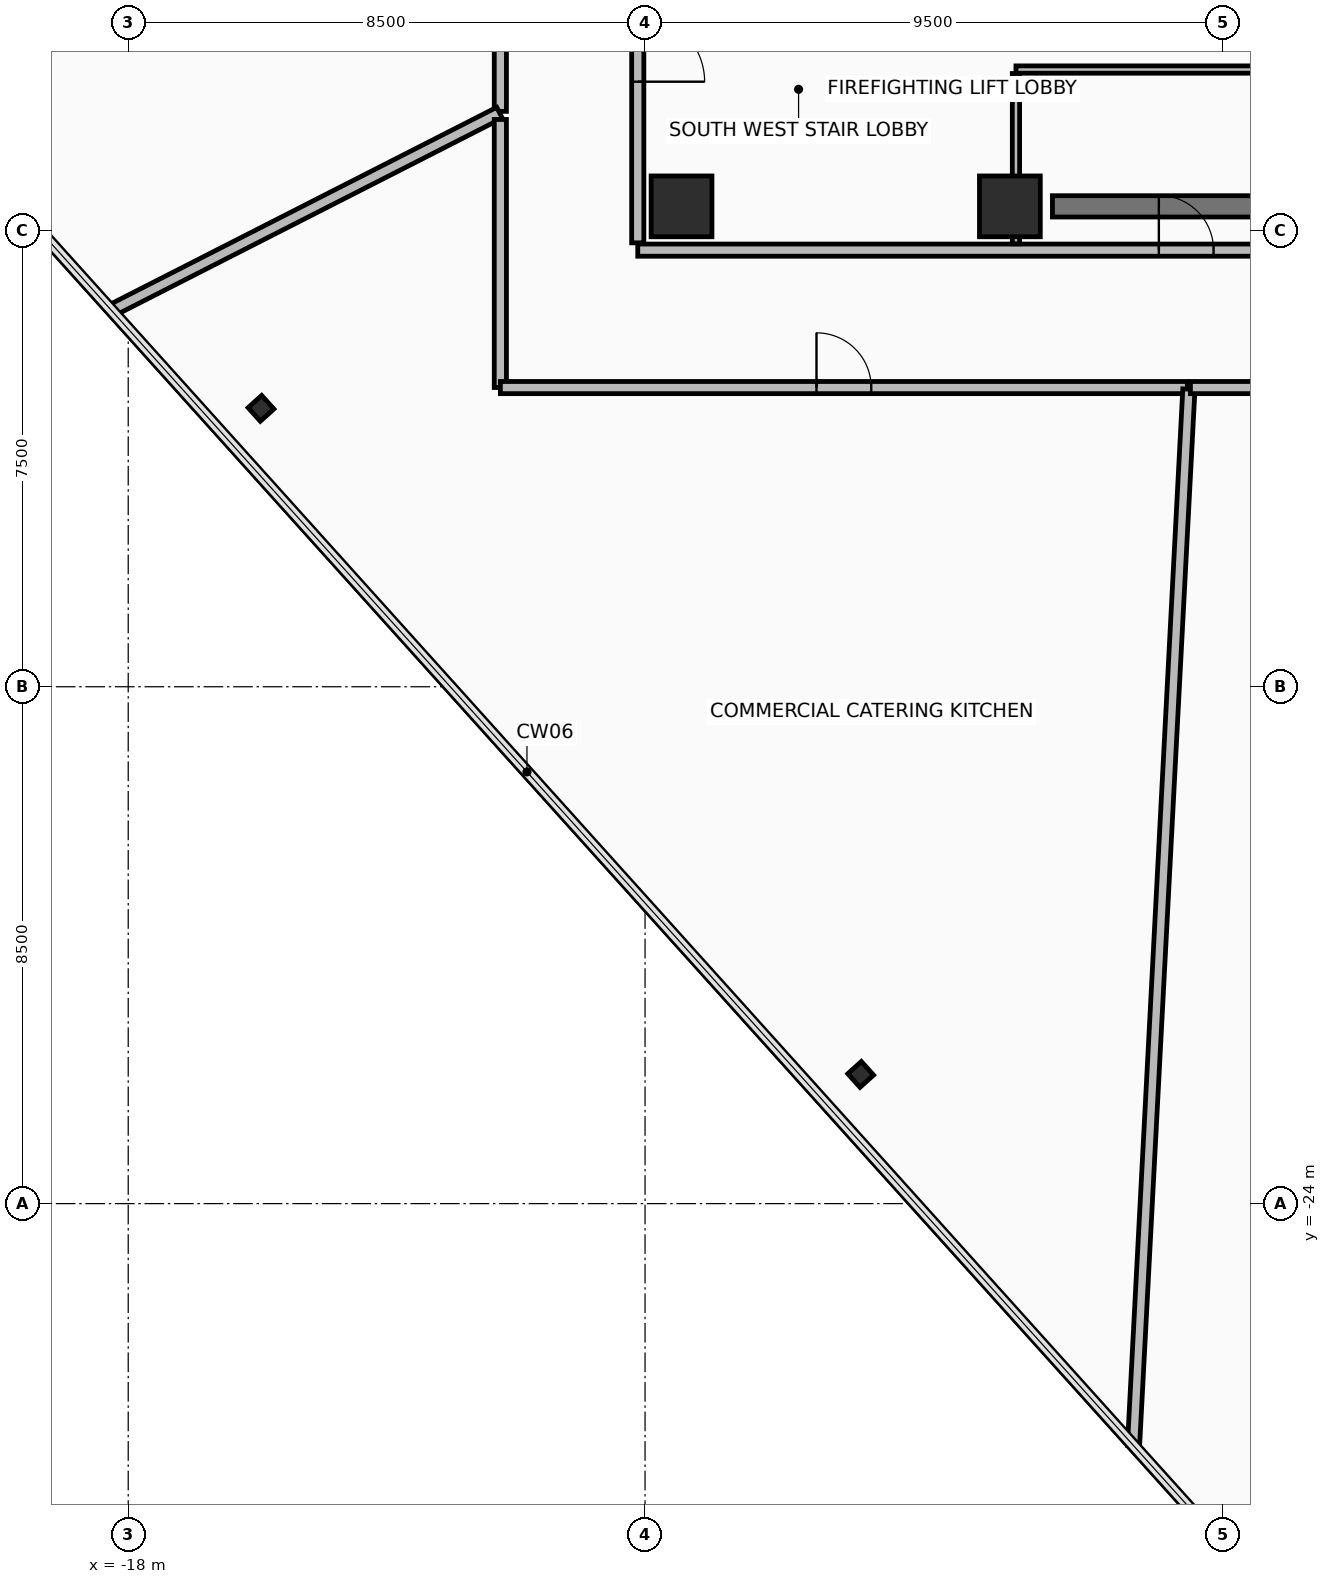
"""IFC4 building model, lengths in metres.
Left out: names, types, materials, properties, quantities, classifications, styles, units other than length and angle.
Written with IfcOpenShell. Run it as: python <this file> out.ifc"""

import sys

from ifc_helpers import new_model, si_unit, direction, frame, frame_2d, origin, origin_2d, place, context, subcontext, project, spatial, rectangle, hollow_rectangle, extrude, element, fill, save


model = new_model("IFC4")
c1 = context("Model", 3, precision=1e-05, world=origin(), true_north=direction((0.0, 1.0)))
c2 = subcontext(c1, "Body", "Model", "MODEL_VIEW")
j1 = project(units=[si_unit("LENGTHUNIT", "METRE"), si_unit("PLANEANGLEUNIT", "RADIAN")], contexts=[c1])
p1 = place(None, origin())
s1 = spatial("IfcSite", under=j1, at=p1, CompositionType="ELEMENT")
p2 = place(p1, origin())
s2 = spatial("IfcBuilding", under=s1, at=p2, CompositionType="ELEMENT")
p3 = place(p2, frame((0.0, 0.0, 298.0)))
s3 = spatial("IfcBuildingStorey", under=s2, at=p3, CompositionType="ELEMENT", Elevation=298.0)
for number, where, z_axis, x_axis in (
    (1, (-8.9, -7.6, 0.0), (0.0, 0.0, 1.0), (1.0, 0.0, 0.0)),
    (2, (-3.5, -7.6, 0.0), (0.0, 0.0, 1.0), (1.0, 0.0, 0.0)),
):
    element("IfcColumn", number, at=place(p3, frame(where, z_axis=z_axis, x_axis=x_axis)), inside=s3, PredefinedType="COLUMN", context=c2, shape_type="SweptSolid", body=[
        extrude(rectangle(XDim=1.0, YDim=1.0, at=origin_2d()), origin(), (0.0, 0.0, 1.0), 4.15),
    ])
for number, where, z_axis, x_axis in (
    (3, (-15.816, -10.922, 0.0), (0.0, 0.0, 1.0), (-0.669, 0.743, 0.0)),
    (4, (-5.954, -21.875, 0.0), (0.0, 0.0, 1.0), (-0.669, 0.743, 0.0)),
):
    element("IfcColumn", number, at=place(p3, frame(where, z_axis=z_axis, x_axis=x_axis)), inside=s3, PredefinedType="COLUMN", context=c2, shape_type="SweptSolid", body=[
        extrude(hollow_rectangle(XDim=0.3, YDim=0.3, WallThickness=0.02, at=origin_2d()), origin(), (0.0, 0.0, 1.0), 4.15),
    ])
p4 = place(p3, frame((-2.8, -7.6, 0.0), z_axis=(0.0, 0.0, 1.0), x_axis=(1.0, 0.0, 0.0)))
e5 = element("IfcWall", 5, at=p4, inside=s3, PredefinedType="SHEAR", context=c2, shape_type="SweptSolid", body=[
    extrude(rectangle(XDim=5.38, YDim=0.35, at=frame_2d((2.69, 0.0))), origin(), (0.0, 0.0, 1.0), 3.95),
])
p5 = place(p3, frame((-9.62, -8.32, 0.0), z_axis=(0.0, 0.0, 1.0), x_axis=(1.0, 0.0, 0.0)))
e6 = element("IfcWall", 6, at=p5, inside=s3, PredefinedType="PARTITIONING", context=c2, shape_type="SweptSolid", body=[
    extrude(rectangle(XDim=19.24, YDim=0.2, at=frame_2d((9.62, 0.0))), origin(), (0.0, 0.0, 1.0), 3.445),
])
p6 = place(p5, frame((8.57, 0.0, 0.0)))
e7 = element("IfcOpeningElement", 7, at=p6, cuts=e6, PredefinedType="OPENING", context=c2, shape_type="SweptSolid", body=[
    extrude(rectangle(XDim=0.9, YDim=2.1, at=frame_2d((0.45, 1.05))), frame((0.0, 0.11, 0.0), z_axis=(0.0, -1.0, 0.0), x_axis=(1.0, 0.0, 0.0)), (0.0, 0.0, 1.0), 0.22),
])
p7 = place(p5, frame((14.045, 0.0, 0.0)))
e8 = element("IfcOpeningElement", 8, at=p7, cuts=e6, PredefinedType="OPENING", context=c2, shape_type="SweptSolid", body=[
    extrude(rectangle(XDim=0.9, YDim=2.1, at=frame_2d((0.45, 1.05))), frame((0.0, 0.11, 0.0), z_axis=(0.0, -1.0, 0.0), x_axis=(1.0, 0.0, 0.0)), (0.0, 0.0, 1.0), 0.22),
])
p8 = place(p5, frame((15.995, 0.0, 0.0)))
e9 = element("IfcOpeningElement", 9, at=p8, cuts=e6, PredefinedType="OPENING", context=c2, shape_type="SweptSolid", body=[
    extrude(rectangle(XDim=0.9, YDim=2.1, at=frame_2d((0.45, 1.05))), frame((0.0, 0.11, 0.0), z_axis=(0.0, -1.0, 0.0), x_axis=(1.0, 0.0, 0.0)), (0.0, 0.0, 1.0), 0.22),
])
p9 = place(p3, frame((-9.62, 8.2, 0.0), z_axis=(0.0, 0.0, 1.0), x_axis=(0.0, -1.0, 0.0)))
e10 = element("IfcWall", 10, at=p9, inside=s3, PredefinedType="PARTITIONING", context=c2, shape_type="SweptSolid", body=[
    extrude(rectangle(XDim=16.4, YDim=0.2, at=frame_2d((8.2, 0.0))), origin(), (0.0, 0.0, 1.0), 3.295),
])
p10 = place(p9, frame((12.65, 0.0, 0.0)))
e11 = element("IfcOpeningElement", 11, at=p10, cuts=e10, PredefinedType="OPENING", context=c2, shape_type="SweptSolid", body=[
    extrude(rectangle(XDim=1.1, YDim=2.15, at=frame_2d((0.55, 1.075))), frame((0.0, 0.11, 0.0), z_axis=(0.0, -1.0, 0.0), x_axis=(1.0, 0.0, 0.0)), (0.0, 0.0, 1.0), 0.22),
])
p11 = place(p3, frame((2.135, -5.35, 0.0), z_axis=(0.0, 0.0, 1.0), x_axis=(-1.0, 0.0, 0.0)))
e12 = element("IfcWall", 12, at=p11, inside=s3, PredefinedType="PARTITIONING", context=c2, shape_type="SweptSolid", body=[
    extrude(rectangle(XDim=5.535, YDim=0.12, at=frame_2d((2.768, 0.0))), origin(), (0.0, 0.0, 1.0), 3.245),
])
p12 = place(p3, frame((-3.4, -5.415, 0.0), z_axis=(0.0, 0.0, 1.0), x_axis=(0.0, -1.0, 0.0)))
e13 = element("IfcWall", 13, at=p12, inside=s3, PredefinedType="PARTITIONING", context=c2, shape_type="SweptSolid", body=[
    extrude(rectangle(XDim=2.8, YDim=0.12, at=frame_2d((1.4, 0.0))), origin(), (0.0, 0.0, 1.0), 3.245),
])
p13 = place(p3, frame((-11.88, 9.646, 0.0), z_axis=(0.0, 0.0, 1.0), x_axis=(0.0, -1.0, 0.0)))
e14 = element("IfcWall", 14, at=p13, inside=s3, PredefinedType="PARTITIONING", context=c2, shape_type="SweptSolid", body=[
    extrude(rectangle(XDim=15.684, YDim=0.2, at=frame_2d((7.842, 0.0))), origin(), (0.0, 0.0, 1.0), 3.295),
])
p14 = place(p13, frame((7.342, 0.0, 0.0)))
e15 = element("IfcOpeningElement", 15, at=p14, cuts=e14, PredefinedType="OPENING", context=c2, shape_type="SweptSolid", body=[
    extrude(rectangle(XDim=1.0, YDim=2.15, at=frame_2d((0.5, 1.075))), frame((0.0, 0.11, 0.0), z_axis=(0.0, -1.0, 0.0), x_axis=(1.0, 0.0, 0.0)), (0.0, 0.0, 1.0), 0.22),
])
p15 = place(p3, frame((-11.894, -6.06, 0.0), z_axis=(0.0, 0.0, 1.0), x_axis=(-0.890996976005, -0.454009238617, 0.0)))
e16 = element("IfcWall", 16, at=p15, inside=s3, PredefinedType="PARTITIONING", context=c2, shape_type="SweptSolid", body=[
    extrude(rectangle(XDim=7.143, YDim=0.2, at=frame_2d((3.571, 0.0))), origin(), (0.0, 0.0, 1.0), 3.295),
])
p16 = place(p3, frame((-11.88, -6.171, 0.0), z_axis=(0.0, 0.0, 1.0), x_axis=(0.0, -1.0, 0.0)))
e17 = element("IfcWall", 17, at=p16, inside=s3, PredefinedType="PARTITIONING", context=c2, shape_type="SweptSolid", body=[
    extrude(rectangle(XDim=4.408, YDim=0.2, at=frame_2d((2.204, 0.0))), origin(), (0.0, 0.0, 1.0), 3.445),
])
p17 = place(p3, frame((-11.879, -10.58, 0.0), z_axis=(0.0, 0.0, 1.0), x_axis=(1.0, 0.0, 0.0)))
e18 = element("IfcWall", 18, at=p17, inside=s3, PredefinedType="PARTITIONING", context=c2, shape_type="SweptSolid", body=[
    extrude(rectangle(XDim=11.299, YDim=0.2, at=frame_2d((5.649, 0.0))), origin(), (0.0, 0.0, 1.0), 3.445),
])
p18 = place(p17, frame((5.199, 0.0, 0.0)))
e19 = element("IfcOpeningElement", 19, at=p18, cuts=e18, PredefinedType="OPENING", context=c2, shape_type="SweptSolid", body=[
    extrude(rectangle(XDim=0.9, YDim=2.1, at=frame_2d((0.45, 1.05))), frame((0.0, 0.11, 0.0), z_axis=(0.0, -1.0, 0.0), x_axis=(1.0, 0.0, 0.0)), (0.0, 0.0, 1.0), 0.22),
])
p19 = place(p3, frame((-0.556, -10.606, 0.0), z_axis=(0.0, 0.0, 1.0), x_axis=(-0.052329765113, -0.998629859199, 0.0)))
e20 = element("IfcWall", 20, at=p19, inside=s3, PredefinedType="PARTITIONING", context=c2, shape_type="SweptSolid", body=[
    extrude(rectangle(XDim=17.397, YDim=0.2, at=frame_2d((8.699, 0.0))), origin(), (0.0, 0.0, 1.0), 3.295),
])
p20 = place(p3, frame((-0.531, -10.58, 0.0), z_axis=(0.0, 0.0, 1.0), x_axis=(1.0, 0.0, 0.0)))
e21 = element("IfcWall", 21, at=p20, inside=s3, PredefinedType="PARTITIONING", context=c2, shape_type="SweptSolid", body=[
    extrude(rectangle(XDim=12.41, YDim=0.2, at=frame_2d((6.205, 0.0))), origin(), (0.0, 0.0, 1.0), 3.445),
])
p21 = place(p20, frame((5.705, 0.0, 0.0)))
e22 = element("IfcOpeningElement", 22, at=p21, cuts=e21, PredefinedType="OPENING", context=c2, shape_type="SweptSolid", body=[
    extrude(rectangle(XDim=1.0, YDim=2.15, at=frame_2d((0.5, 1.075))), frame((0.0, 0.11, 0.0), z_axis=(0.0, -1.0, 0.0), x_axis=(1.0, 0.0, 0.0)), (0.0, 0.0, 1.0), 0.22),
])
p22 = place(p10, frame((1.1, 0.0, 0.0), z_axis=(0.0, 0.0, 1.0), x_axis=(-1.0, 0.0, 0.0)))
e23 = element("IfcDoor", 23, at=p22, inside=s3, OperationType="SINGLE_SWING_LEFT", PredefinedType="DOOR", context=c2, shape_type="SweptSolid", body=[
    extrude(rectangle(XDim=1.1, YDim=2.15, at=frame_2d((0.55, 1.075))), frame((0.0, 0.025, 0.0), z_axis=(0.0, -1.0, 0.0), x_axis=(1.0, 0.0, 0.0)), (0.0, 0.0, 1.0), 0.05),
])
fill(e11, e23)
p23 = place(p6, origin())
e24 = element("IfcDoor", 24, at=p23, inside=s3, OperationType="SINGLE_SWING_LEFT", PredefinedType="DOOR", context=c2, shape_type="SweptSolid", body=[
    extrude(rectangle(XDim=0.9, YDim=2.1, at=frame_2d((0.45, 1.05))), frame((0.0, 0.025, 0.0), z_axis=(0.0, -1.0, 0.0), x_axis=(1.0, 0.0, 0.0)), (0.0, 0.0, 1.0), 0.05),
])
fill(e7, e24)
p24 = place(p18, origin())
e25 = element("IfcDoor", 25, at=p24, inside=s3, OperationType="SINGLE_SWING_LEFT", PredefinedType="DOOR", context=c2, shape_type="SweptSolid", body=[
    extrude(rectangle(XDim=0.9, YDim=2.1, at=frame_2d((0.45, 1.05))), frame((0.0, 0.025, 0.0), z_axis=(0.0, -1.0, 0.0), x_axis=(1.0, 0.0, 0.0)), (0.0, 0.0, 1.0), 0.05),
])
fill(e19, e25)
save(model, sys.argv[1])
